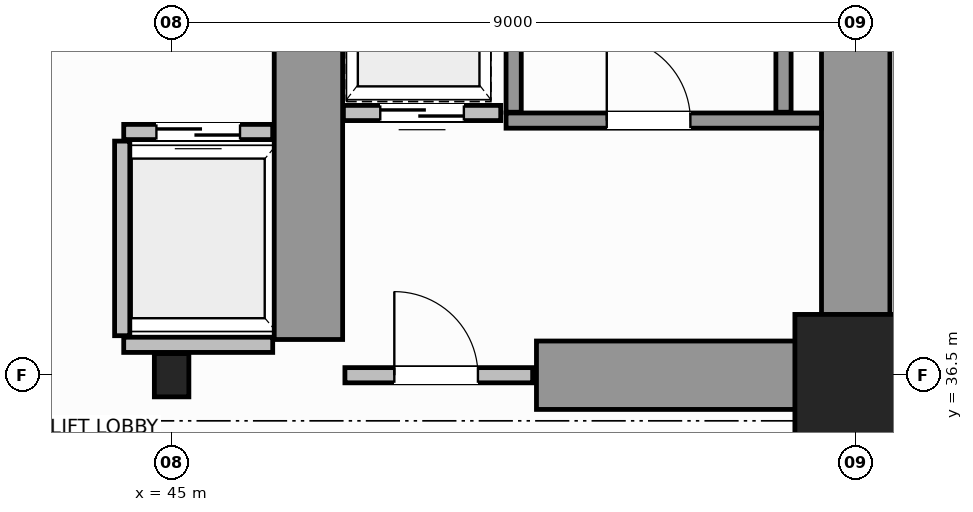
"""IFC4 building model, lengths in metres.
Left out: names, types, materials, properties, quantities, classifications, styles, units other than length and angle.
Written with IfcOpenShell. Run it as: python <this file> out.ifc"""

import sys

from ifc_helpers import new_model, si_unit, direction, frame, frame_2d, origin, origin_2d, place, context, subcontext, project, spatial, rectangle, i_section, extrude, source, transform, mapped, element, fill, save


model = new_model("IFC4")
c1 = context("Model", 3, precision=1e-05, world=origin(), true_north=direction((0.0, 1.0)))
c2 = subcontext(c1, "Body", "Model", "MODEL_VIEW")
j1 = project(units=[si_unit("LENGTHUNIT", "METRE"), si_unit("PLANEANGLEUNIT", "RADIAN")], contexts=[c1])
p1 = place(None, origin())
s1 = spatial("IfcSite", under=j1, at=p1, CompositionType="ELEMENT")
p2 = place(p1, origin())
s2 = spatial("IfcBuilding", under=s1, at=p2, CompositionType="ELEMENT")
p3 = place(p2, origin())
s3 = spatial("IfcBuildingStorey", under=s2, at=p3, CompositionType="ELEMENT", Elevation=0.0)
m1 = source(origin(), c2, "Body", "SweptSolid", [
    extrude(i_section(OverallWidth=0.454, OverallDepth=0.569, WebThickness=0.078, FlangeThickness=0.08, FilletRadius=0.015, at=origin_2d()), origin(), (0.0, 0.0, 1.0), 5.6),
])
p4 = place(p3, frame((45.0, 36.5, 0.0), z_axis=(0.0, 0.0, 1.0), x_axis=(1.0, 0.0, 0.0)))
e1 = element("IfcColumn", 1, at=p4, inside=s3, PredefinedType="COLUMN", context=c2, shape_type="MappedRepresentation", body=[
    mapped(m1, transform((0.0, 0.0, 0.0), scale=1.0)),
])
m2 = source(origin(), c2, "Body", "SweptSolid", [
    extrude(rectangle(XDim=1.6, YDim=1.6, at=origin_2d()), origin(), (0.0, 0.0, 1.0), 5.6),
])
p5 = place(p3, frame((54.0, 36.5, 0.0), z_axis=(0.0, 0.0, 1.0), x_axis=(1.0, 0.0, 0.0)))
e2 = element("IfcColumn", 2, at=p5, inside=s3, PredefinedType="COLUMN", context=c2, shape_type="MappedRepresentation", body=[
    mapped(m2, transform((0.0, 0.0, 0.0), scale=1.0)),
])
p6 = place(p3, frame((54.0, 36.5, 0.0), z_axis=(0.0, 0.0, 1.0), x_axis=(0.0, 1.0, 0.0)))
e3 = element("IfcWall", 3, at=p6, inside=s3, PredefinedType="SHEAR", context=c2, shape_type="SweptSolid", body=[
    extrude(rectangle(XDim=14.5, YDim=0.9, at=frame_2d((7.25, 0.0))), origin(), (0.0, 0.0, 1.0), 5.6),
])
p7 = place(p3, frame((49.8, 36.5, 0.0), z_axis=(0.0, 0.0, 1.0), x_axis=(1.0, 0.0, 0.0)))
e4 = element("IfcWall", 4, at=p7, inside=s3, PredefinedType="SHEAR", context=c2, shape_type="SweptSolid", body=[
    extrude(rectangle(XDim=3.73, YDim=0.9, at=frame_2d((1.865, 0.0))), origin(), (0.0, 0.0, 1.0), 4.12),
])
p8 = place(p3, frame((46.8, 36.97, 0.0), z_axis=(0.0, 0.0, 1.0), x_axis=(0.0, 1.0, 0.0)))
e5 = element("IfcWall", 5, at=p8, inside=s3, PredefinedType="SHEAR", context=c2, shape_type="SweptSolid", body=[
    extrude(rectangle(XDim=9.23, YDim=0.9, at=frame_2d((4.615, 0.0))), origin(), (0.0, 0.0, 1.0), 5.6),
])
p9 = place(p3, frame((49.4, 39.85, 0.0), z_axis=(0.0, 0.0, 1.0), x_axis=(1.0, 0.0, 0.0)))
e6 = element("IfcWall", 6, at=p9, inside=s3, PredefinedType="SOLIDWALL", context=c2, shape_type="SweptSolid", body=[
    extrude(rectangle(XDim=4.15, YDim=0.2, at=frame_2d((2.075, 0.0))), origin(), (0.0, 0.0, 1.0), 5.6),
])
p10 = place(p9, frame((1.325, 0.0, 0.0)))
e7 = element("IfcOpeningElement", 7, at=p10, cuts=e6, PredefinedType="OPENING", context=c2, shape_type="SweptSolid", body=[
    extrude(rectangle(XDim=1.1, YDim=2.15, at=frame_2d((0.55, 1.075))), frame((0.0, 0.11, 0.0), z_axis=(0.0, -1.0, 0.0), x_axis=(1.0, 0.0, 0.0)), (0.0, 0.0, 1.0), 0.22),
])
for number, where, z_axis, x_axis in (
    (8, (49.5, 39.96, 0.0), (0.0, 0.0, 1.0), (0.0, 1.0, 0.0)),
    (9, (53.05, 39.96, 0.0), (0.0, 0.0, 1.0), (0.0, 1.0, 0.0)),
):
    element("IfcWall", number, at=place(p3, frame(where, z_axis=z_axis, x_axis=x_axis)), inside=s3, PredefinedType="SOLIDWALL", context=c2, shape_type="SweptSolid", body=[
        extrude(rectangle(XDim=9.93, YDim=0.2, at=frame_2d((4.965, 0.0))), origin(), (0.0, 0.0, 1.0), 5.6),
    ])
p11 = place(p3, frame((47.28, 36.5, 0.0), z_axis=(0.0, 0.0, 1.0), x_axis=(1.0, 0.0, 0.0)))
e10 = element("IfcWall", 10, at=p11, inside=s3, PredefinedType="SOLIDWALL", context=c2, shape_type="SweptSolid", body=[
    extrude(rectangle(XDim=2.47, YDim=0.2, at=frame_2d((1.235, 0.0))), origin(), (0.0, 0.0, 1.0), 4.11),
])
p12 = place(p11, frame((0.65, 0.0, 0.0)))
e11 = element("IfcOpeningElement", 11, at=p12, cuts=e10, PredefinedType="OPENING", context=c2, shape_type="SweptSolid", body=[
    extrude(rectangle(XDim=1.1, YDim=2.15, at=frame_2d((0.55, 1.075))), frame((0.0, 0.11, 0.0), z_axis=(0.0, -1.0, 0.0), x_axis=(1.0, 0.0, 0.0)), (0.0, 0.0, 1.0), 0.22),
])
p13 = place(p3, frame((44.37, 39.7, 0.0), z_axis=(0.0, 0.0, 1.0), x_axis=(1.0, 0.0, 0.0)))
e12 = element("IfcWall", 12, at=p13, inside=s3, PredefinedType="SOLIDWALL", context=c2, shape_type="SweptSolid", body=[
    extrude(rectangle(XDim=1.96, YDim=0.2, at=frame_2d((0.98, 0.0))), origin(), (0.0, 0.0, 1.0), 5.32),
])
p14 = place(p13, frame((0.43, 0.0, 0.0)))
e13 = element("IfcOpeningElement", 13, at=p14, cuts=e12, PredefinedType="OPENING", context=c2, shape_type="SweptSolid", body=[
    extrude(rectangle(XDim=1.1, YDim=2.15, at=frame_2d((0.55, 1.075))), frame((0.0, 0.11, 0.0), z_axis=(0.0, -1.0, 0.0), x_axis=(1.0, 0.0, 0.0)), (0.0, 0.0, 1.0), 0.22),
])
p15 = place(p3, frame((44.37, 36.9, 0.0), z_axis=(0.0, 0.0, 1.0), x_axis=(1.0, 0.0, 0.0)))
e14 = element("IfcWall", 14, at=p15, inside=s3, PredefinedType="SOLIDWALL", context=c2, shape_type="SweptSolid", body=[
    extrude(rectangle(XDim=1.96, YDim=0.2, at=frame_2d((0.98, 0.0))), origin(), (0.0, 0.0, 1.0), 4.11),
])
p16 = place(p3, frame((44.35, 37.02, 0.0), z_axis=(0.0, 0.0, 1.0), x_axis=(0.0, 1.0, 0.0)))
e15 = element("IfcWall", 15, at=p16, inside=s3, PredefinedType="SOLIDWALL", context=c2, shape_type="SweptSolid", body=[
    extrude(rectangle(XDim=2.56, YDim=0.2, at=frame_2d((1.28, 0.0))), origin(), (0.0, 0.0, 1.0), 5.32),
])
p17 = place(p3, frame((47.26, 39.95, 0.0), z_axis=(0.0, 0.0, 1.0), x_axis=(1.0, 0.0, 0.0)))
e16 = element("IfcWall", 16, at=p17, inside=s3, PredefinedType="SOLIDWALL", context=c2, shape_type="SweptSolid", body=[
    extrude(rectangle(XDim=2.07, YDim=0.2, at=frame_2d((1.035, 0.0))), origin(), (0.0, 0.0, 1.0), 5.32),
])
p18 = place(p17, frame((0.485, 0.0, 0.0)))
e17 = element("IfcOpeningElement", 17, at=p18, cuts=e16, PredefinedType="OPENING", context=c2, shape_type="SweptSolid", body=[
    extrude(rectangle(XDim=1.1, YDim=2.15, at=frame_2d((0.55, 1.075))), frame((0.0, 0.11, 0.0), z_axis=(0.0, -1.0, 0.0), x_axis=(1.0, 0.0, 0.0)), (0.0, 0.0, 1.0), 0.22),
])
p19 = place(p3, frame((54.1, 36.55, 0.0), z_axis=(0.0, 0.0, 1.0), x_axis=(1.0, 0.0, 0.0)))
e18 = element("IfcWall", 18, at=p19, inside=s3, PredefinedType="SOLIDWALL", context=c2, shape_type="SweptSolid", body=[
    extrude(rectangle(XDim=8.55, YDim=0.2, at=frame_2d((4.275, 0.0))), origin(), (0.0, 0.0, 1.0), 4.4),
])
p20 = place(p19, frame((2.8, 0.0, 0.0)))
e19 = element("IfcOpeningElement", 19, at=p20, cuts=e18, PredefinedType="OPENING", context=c2, shape_type="SweptSolid", body=[
    extrude(rectangle(XDim=1.1, YDim=2.15, at=frame_2d((0.55, 1.075))), frame((0.0, 0.11, 0.0), z_axis=(0.0, -1.0, 0.0), x_axis=(1.0, 0.0, 0.0)), (0.0, 0.0, 1.0), 0.22),
])
m3 = source(origin(), c2, "Body", "SweptSolid", [
    extrude(rectangle(XDim=1.1, YDim=2.15, at=frame_2d((0.55, 1.075))), frame((0.0, 0.025, 0.0), z_axis=(0.0, -1.0, 0.0), x_axis=(1.0, 0.0, 0.0)), (0.0, 0.0, 1.0), 0.05),
])
p21 = place(p10, origin())
e20 = element("IfcDoor", 20, at=p21, inside=s3, OperationType="SINGLE_SWING_RIGHT", PredefinedType="DOOR", context=c2, shape_type="MappedRepresentation", body=[
    mapped(m3, transform((0.0, 0.0, 0.0), scale=1.0)),
])
fill(e7, e20)
p22 = place(p12, origin())
e21 = element("IfcDoor", 21, at=p22, inside=s3, OperationType="SINGLE_SWING_LEFT", PredefinedType="DOOR", context=c2, shape_type="MappedRepresentation", body=[
    mapped(m3, transform((0.0, 0.0, 0.0), scale=1.0)),
])
fill(e11, e21)
p23 = place(p14, origin())
e22 = element("IfcDoor", 22, at=p23, inside=s3, OperationType="DOUBLE_DOOR_SLIDING", PredefinedType="DOOR", context=c2, shape_type="MappedRepresentation", body=[
    mapped(m3, transform((0.0, 0.0, 0.0), scale=1.0)),
])
fill(e13, e22)
p24 = place(p18, origin())
e23 = element("IfcDoor", 23, at=p24, inside=s3, OperationType="DOUBLE_DOOR_SLIDING", PredefinedType="DOOR", context=c2, shape_type="MappedRepresentation", body=[
    mapped(m3, transform((0.0, 0.0, 0.0), scale=1.0)),
])
fill(e17, e23)
save(model, sys.argv[1])
